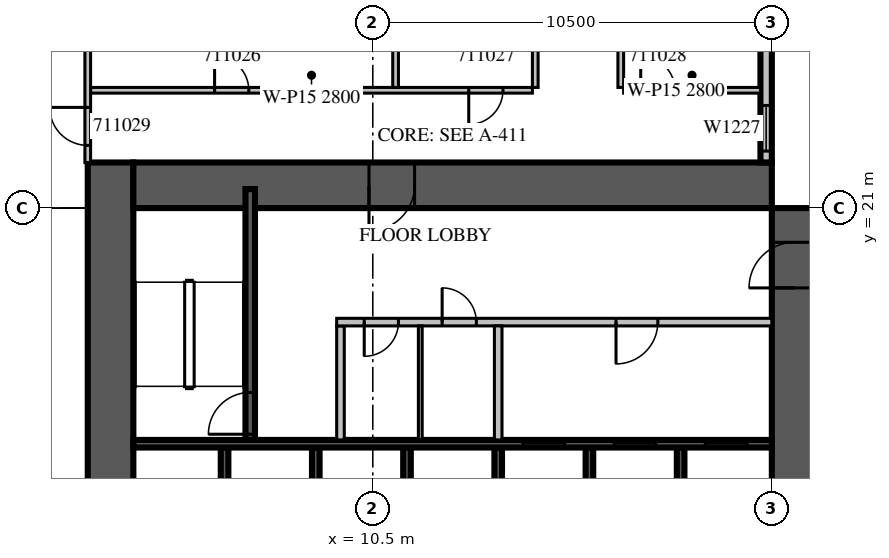
"""IFC4 building model, lengths in metres.
Left out: names, types, materials, properties, quantities, classifications, styles, units other than length and angle.
Written with IfcOpenShell. Run it as: python <this file> out.ifc"""

import sys

from ifc_helpers import new_model, si_unit, direction, frame, frame_2d, origin, place, context, subcontext, project, spatial, rectangle, extrude, source, transform, mapped, element, fill, save


model = new_model("IFC4")
c1 = context("Model", 3, precision=1e-05, world=origin(), true_north=direction((0.0, 1.0)))
c2 = subcontext(c1, "Body", "Model", "MODEL_VIEW")
j1 = project(units=[si_unit("LENGTHUNIT", "METRE"), si_unit("PLANEANGLEUNIT", "RADIAN")], contexts=[c1])
p1 = place(None, origin())
s1 = spatial("IfcSite", under=j1, at=p1, CompositionType="ELEMENT")
p2 = place(p1, origin())
s2 = spatial("IfcBuilding", under=s1, at=p2, CompositionType="ELEMENT")
p3 = place(p2, frame((0.0, 0.0, 57.3)))
s3 = spatial("IfcBuildingStorey", under=s2, at=p3, CompositionType="ELEMENT", Elevation=57.3)
m1 = source(origin(), c2, "Body", "SweptSolid", [
    extrude(rectangle(XDim=18.0, YDim=1.2, at=frame_2d((9.0, 0.0))), origin(), (0.0, 0.0, 1.0), 4.2),
])
p4 = place(p3, frame((3.6, 4.2, 0.0), z_axis=(0.0, 0.0, 1.0), x_axis=(0.0, 1.0, 0.0)))
e1 = element("IfcWall", 1, at=p4, inside=s3, PredefinedType="SHEAR", context=c2, shape_type="MappedRepresentation", body=[
    mapped(m1, transform((0.0, 0.0, 0.0), scale=1.0)),
])
m2 = source(origin(), c2, "Body", "SweptSolid", [
    extrude(rectangle(XDim=2.2, YDim=2.1, at=frame_2d((1.1, 1.05))), frame((0.0, 0.61, 0.0), z_axis=(0.0, -1.0, 0.0), x_axis=(1.0, 0.0, 0.0)), (0.0, 0.0, 1.0), 1.22),
])
p5 = place(p4, frame((4.2, 0.0, 0.0)))
e2 = element("IfcOpeningElement", 2, at=p5, cuts=e1, PredefinedType="OPENING", context=c2, shape_type="MappedRepresentation", body=[
    mapped(m2, transform((0.0, 0.0, 0.0), scale=1.0)),
])
m3 = source(origin(), c2, "Body", "SweptSolid", [
    extrude(rectangle(XDim=16.8, YDim=1.2, at=frame_2d((8.4, 0.0))), origin(), (0.0, 0.0, 1.0), 4.2),
])
p6 = place(p3, frame((21.6, 4.2, 0.0), z_axis=(0.0, 0.0, 1.0), x_axis=(0.0, 1.0, 0.0)))
e3 = element("IfcWall", 3, at=p6, inside=s3, PredefinedType="SHEAR", context=c2, shape_type="MappedRepresentation", body=[
    mapped(m3, transform((0.0, 0.0, 0.0), scale=1.0)),
])
m4 = source(origin(), c2, "Body", "SweptSolid", [
    extrude(rectangle(XDim=1.2, YDim=2.1, at=frame_2d((0.6, 1.05))), frame((0.0, 0.61, 0.0), z_axis=(0.0, -1.0, 0.0), x_axis=(1.0, 0.0, 0.0)), (0.0, 0.0, 1.0), 1.22),
])
p7 = place(p6, frame((14.7, 0.0, 0.0)))
e4 = element("IfcOpeningElement", 4, at=p7, cuts=e3, PredefinedType="OPENING", context=c2, shape_type="MappedRepresentation", body=[
    mapped(m4, transform((0.0, 0.0, 0.0), scale=1.0)),
])
p8 = place(p3, frame((4.2, 21.6, 0.0), z_axis=(0.0, 0.0, 1.0), x_axis=(1.0, 0.0, 0.0)))
e5 = element("IfcWall", 5, at=p8, inside=s3, PredefinedType="SHEAR", context=c2, shape_type="MappedRepresentation", body=[
    mapped(m3, transform((0.0, 0.0, 0.0), scale=1.0)),
])
p9 = place(p8, frame((6.2, 0.0, 0.0)))
e6 = element("IfcOpeningElement", 6, at=p9, cuts=e5, PredefinedType="OPENING", context=c2, shape_type="MappedRepresentation", body=[
    mapped(m4, transform((0.0, 0.0, 0.0), scale=1.0)),
])
p10 = place(p3, frame((20.85, 22.2, 0.0), z_axis=(0.0, 0.0, 1.0), x_axis=(0.0, 1.0, 0.0)))
e7 = element("IfcWall", 7, at=p10, inside=s3, PredefinedType="STANDARD", context=c2, shape_type="SweptSolid", body=[
    extrude(rectangle(XDim=6.6, YDim=0.3, at=frame_2d((3.3, 0.0))), origin(), (0.0, 0.0, 1.0), 3.3),
])
m5 = source(origin(), c2, "Body", "SweptSolid", [
    extrude(rectangle(XDim=1.2, YDim=2.7, at=frame_2d((0.6, 1.35))), frame((0.0, 0.16, 0.0), z_axis=(0.0, -1.0, 0.0), x_axis=(1.0, 0.0, 0.0)), (0.0, 0.0, 1.0), 0.32),
])
p11 = place(p10, frame((0.3, 0.0, 0.6)))
e8 = element("IfcOpeningElement", 8, at=p11, cuts=e7, PredefinedType="OPENING", context=c2, shape_type="MappedRepresentation", body=[
    mapped(m5, transform((0.0, 0.0, 0.0), scale=1.0)),
])
m6 = source(origin(), c2, "Body", "SweptSolid", [
    extrude(rectangle(XDim=2.4, YDim=2.7, at=frame_2d((1.2, 1.35))), frame((0.0, 0.16, 0.0), z_axis=(0.0, -1.0, 0.0), x_axis=(1.0, 0.0, 0.0)), (0.0, 0.0, 1.0), 0.32),
])
p12 = place(p10, frame((3.9, 0.0, 0.6)))
e9 = element("IfcOpeningElement", 9, at=p12, cuts=e7, PredefinedType="OPENING", context=c2, shape_type="MappedRepresentation", body=[
    mapped(m6, transform((0.0, 0.0, 0.0), scale=1.0)),
])
m7 = source(origin(), c2, "Body", "SweptSolid", [
    extrude(rectangle(XDim=3.0, YDim=0.2, at=frame_2d((1.5, 0.0))), origin(), (0.0, 0.0, 1.0), 4.2),
])
for number, where, z_axis, x_axis in (
    (10, (6.6, 11.7, 0.0), (0.0, 0.0, 1.0), (0.0, 1.0, 0.0)),
    (11, (9.0, 11.7, 0.0), (0.0, 0.0, 1.0), (0.0, 1.0, 0.0)),
    (12, (11.4, 11.7, 0.0), (0.0, 0.0, 1.0), (0.0, 1.0, 0.0)),
    (13, (13.8, 11.7, 0.0), (0.0, 0.0, 1.0), (0.0, 1.0, 0.0)),
    (14, (16.2, 11.7, 0.0), (0.0, 0.0, 1.0), (0.0, 1.0, 0.0)),
    (15, (18.6, 11.7, 0.0), (0.0, 0.0, 1.0), (0.0, 1.0, 0.0)),
):
    element("IfcWall", number, at=place(p3, frame(where, z_axis=z_axis, x_axis=x_axis)), inside=s3, PredefinedType="SOLIDWALL", context=c2, shape_type="MappedRepresentation", body=[
        mapped(m7, transform((0.0, 0.0, 0.0), scale=1.0)),
    ])
m8 = source(origin(), c2, "Body", "SweptSolid", [
    extrude(rectangle(XDim=16.8, YDim=0.2, at=frame_2d((8.4, 0.0))), origin(), (0.0, 0.0, 1.0), 4.2),
])
p13 = place(p3, frame((4.2, 14.8, 0.0), z_axis=(0.0, 0.0, 1.0), x_axis=(1.0, 0.0, 0.0)))
e16 = element("IfcWall", 16, at=p13, inside=s3, PredefinedType="SOLIDWALL", context=c2, shape_type="MappedRepresentation", body=[
    mapped(m8, transform((0.0, 0.0, 0.0), scale=1.0)),
])
m9 = source(origin(), c2, "Body", "SweptSolid", [
    extrude(rectangle(XDim=1.1, YDim=2.1, at=frame_2d((0.55, 1.05))), frame((0.0, 0.11, 0.0), z_axis=(0.0, -1.0, 0.0), x_axis=(1.0, 0.0, 0.0)), (0.0, 0.0, 1.0), 0.22),
])
p14 = place(p13, frame((10.25, 0.0, 0.0)))
e17 = element("IfcOpeningElement", 17, at=p14, cuts=e16, PredefinedType="OPENING", context=c2, shape_type="MappedRepresentation", body=[
    mapped(m9, transform((0.0, 0.0, 0.0), scale=1.0)),
])
p15 = place(p13, frame((12.65, 0.0, 0.0)))
e18 = element("IfcOpeningElement", 18, at=p15, cuts=e16, PredefinedType="OPENING", context=c2, shape_type="MappedRepresentation", body=[
    mapped(m9, transform((0.0, 0.0, 0.0), scale=1.0)),
])
p16 = place(p13, frame((15.05, 0.0, 0.0)))
e19 = element("IfcOpeningElement", 19, at=p16, cuts=e16, PredefinedType="OPENING", context=c2, shape_type="MappedRepresentation", body=[
    mapped(m9, transform((0.0, 0.0, 0.0), scale=1.0)),
])
m10 = source(origin(), c2, "Body", "SweptSolid", [
    extrude(rectangle(XDim=6.6, YDim=0.25, at=frame_2d((3.3, 0.0))), origin(), (0.0, 0.0, 1.0), 3.8),
])
p17 = place(p3, frame((7.275, 14.9, 0.0), z_axis=(0.0, 0.0, 1.0), x_axis=(0.0, 1.0, 0.0)))
e20 = element("IfcWall", 20, at=p17, inside=s3, PredefinedType="SOLIDWALL", context=c2, shape_type="MappedRepresentation", body=[
    mapped(m10, transform((0.0, 0.0, 0.0), scale=1.0)),
])
m11 = source(origin(), c2, "Body", "SweptSolid", [
    extrude(rectangle(XDim=1.1, YDim=2.1, at=frame_2d((0.55, 1.05))), frame((0.0, 0.135, 0.0), z_axis=(0.0, -1.0, 0.0), x_axis=(1.0, 0.0, 0.0)), (0.0, 0.0, 1.0), 0.27),
])
p18 = place(p17, frame((0.15, 0.0, 0.0)))
e21 = element("IfcOpeningElement", 21, at=p18, cuts=e20, PredefinedType="OPENING", context=c2, shape_type="MappedRepresentation", body=[
    mapped(m11, transform((0.0, 0.0, 0.0), scale=1.0)),
])
m12 = source(origin(), c2, "Body", "SweptSolid", [
    extrude(rectangle(XDim=3.0, YDim=0.2, at=frame_2d((1.5, 0.0))), origin(), (0.0, 0.0, 1.0), 3.8),
])
p19 = place(p3, frame((9.65, 14.9, 0.0), z_axis=(0.0, 0.0, 1.0), x_axis=(0.0, 1.0, 0.0)))
e22 = element("IfcWall", 22, at=p19, inside=s3, PredefinedType="PARTITIONING", context=c2, shape_type="MappedRepresentation", body=[
    mapped(m12, transform((0.0, 0.0, 0.0), scale=1.0)),
])
m13 = source(origin(), c2, "Body", "SweptSolid", [
    extrude(rectangle(XDim=11.45, YDim=0.2, at=frame_2d((5.725, 0.0))), origin(), (0.0, 0.0, 1.0), 3.8),
])
p20 = place(p3, frame((9.55, 18.0, 0.0), z_axis=(0.0, 0.0, 1.0), x_axis=(1.0, 0.0, 0.0)))
e23 = element("IfcWall", 23, at=p20, inside=s3, PredefinedType="PARTITIONING", context=c2, shape_type="MappedRepresentation", body=[
    mapped(m13, transform((0.0, 0.0, 0.0), scale=1.0)),
])
m14 = source(origin(), c2, "Body", "SweptSolid", [
    extrude(rectangle(XDim=0.9, YDim=2.1, at=frame_2d((0.45, 1.05))), frame((0.0, 0.11, 0.0), z_axis=(0.0, -1.0, 0.0), x_axis=(1.0, 0.0, 0.0)), (0.0, 0.0, 1.0), 0.22),
])
p21 = place(p20, frame((0.725, 0.0, 0.0)))
e24 = element("IfcOpeningElement", 24, at=p21, cuts=e23, PredefinedType="OPENING", context=c2, shape_type="MappedRepresentation", body=[
    mapped(m14, transform((0.0, 0.0, 0.0), scale=1.0)),
])
p22 = place(p20, frame((2.775, 0.0, 0.0)))
e25 = element("IfcOpeningElement", 25, at=p22, cuts=e23, PredefinedType="OPENING", context=c2, shape_type="MappedRepresentation", body=[
    mapped(m14, transform((0.0, 0.0, 0.0), scale=1.0)),
])
p23 = place(p20, frame((7.35, 0.0, 0.0)))
e26 = element("IfcOpeningElement", 26, at=p23, cuts=e23, PredefinedType="OPENING", context=c2, shape_type="MappedRepresentation", body=[
    mapped(m9, transform((0.0, 0.0, 0.0), scale=1.0)),
])
p24 = place(p3, frame((13.8, 14.9, 0.0), z_axis=(0.0, 0.0, 1.0), x_axis=(0.0, 1.0, 0.0)))
e27 = element("IfcWall", 27, at=p24, inside=s3, PredefinedType="PARTITIONING", context=c2, shape_type="MappedRepresentation", body=[
    mapped(m12, transform((0.0, 0.0, 0.0), scale=1.0)),
])
m15 = source(origin(), c2, "Body", "SweptSolid", [
    extrude(rectangle(XDim=3.0, YDim=0.1, at=frame_2d((1.5, 0.0))), origin(), (0.0, 0.0, 1.0), 3.8),
])
p25 = place(p3, frame((11.75, 14.9, 0.0), z_axis=(0.0, 0.0, 1.0), x_axis=(0.0, 1.0, 0.0)))
e28 = element("IfcWall", 28, at=p25, inside=s3, PredefinedType="PARTITIONING", context=c2, shape_type="MappedRepresentation", body=[
    mapped(m15, transform((0.0, 0.0, 0.0), scale=1.0)),
])
p26 = place(p3, frame((3.075, 24.1, 0.0), z_axis=(0.0, 0.0, 1.0), x_axis=(1.0, 0.0, 0.0)))
e29 = element("IfcWall", 29, at=p26, inside=s3, PredefinedType="PARTITIONING", context=c2, shape_type="SweptSolid", body=[
    extrude(rectangle(XDim=11.625, YDim=0.15, at=frame_2d((5.812, 0.0))), origin(), (0.0, 0.0, 1.0), 2.8),
])
m16 = source(origin(), c2, "Body", "SweptSolid", [
    extrude(rectangle(XDim=0.9, YDim=2.1, at=frame_2d((0.45, 1.05))), frame((0.0, 0.085, 0.0), z_axis=(0.0, -1.0, 0.0), x_axis=(1.0, 0.0, 0.0)), (0.0, 0.0, 1.0), 0.17),
])
p27 = place(p26, frame((3.263, 0.0, 0.0)))
e30 = element("IfcOpeningElement", 30, at=p27, cuts=e29, PredefinedType="OPENING", context=c2, shape_type="MappedRepresentation", body=[
    mapped(m16, transform((0.0, 0.0, 0.0), scale=1.0)),
])
p28 = place(p26, frame((9.95, 0.0, 0.0)))
e31 = element("IfcOpeningElement", 31, at=p28, cuts=e29, PredefinedType="OPENING", context=c2, shape_type="MappedRepresentation", body=[
    mapped(m16, transform((0.0, 0.0, 0.0), scale=1.0)),
])
m17 = source(origin(), c2, "Body", "SweptSolid", [
    extrude(rectangle(XDim=3.6, YDim=0.15, at=frame_2d((1.8, 0.0))), origin(), (0.0, 0.0, 1.0), 2.8),
])
p29 = place(p3, frame((17.1, 24.1, 0.0), z_axis=(0.0, 0.0, 1.0), x_axis=(1.0, 0.0, 0.0)))
e32 = element("IfcWall", 32, at=p29, inside=s3, PredefinedType="PARTITIONING", context=c2, shape_type="MappedRepresentation", body=[
    mapped(m17, transform((0.0, 0.0, 0.0), scale=1.0)),
])
p30 = place(p29, frame((0.45, 0.0, 0.0)))
e33 = element("IfcOpeningElement", 33, at=p30, cuts=e32, PredefinedType="OPENING", context=c2, shape_type="MappedRepresentation", body=[
    mapped(m16, transform((0.0, 0.0, 0.0), scale=1.0)),
])
m18 = source(origin(), c2, "Body", "SweptSolid", [
    extrude(rectangle(XDim=5.15, YDim=0.15, at=frame_2d((2.575, 0.0))), origin(), (0.0, 0.0, 1.0), 3.3),
])
for number, where, z_axis, x_axis in (
    (34, (11.1, 24.175, 0.0), (0.0, 0.0, 1.0), (0.0, 1.0, 0.0)),
    (35, (14.775, 24.175, 0.0), (0.0, 0.0, 1.0), (0.0, 1.0, 0.0)),
    (36, (17.025, 29.325, 0.0), (0.0, 0.0, 1.0), (0.0, -1.0, 0.0)),
):
    element("IfcWall", number, at=place(p3, frame(where, z_axis=z_axis, x_axis=x_axis)), inside=s3, PredefinedType="PARTITIONING", context=c2, shape_type="MappedRepresentation", body=[
        mapped(m18, transform((0.0, 0.0, 0.0), scale=1.0)),
    ])
m19 = source(origin(), c2, "Body", "SweptSolid", [
    extrude(rectangle(XDim=7.125, YDim=0.15, at=frame_2d((3.562, 0.0))), origin(), (0.0, 0.0, 1.0), 3.8),
])
p31 = place(p3, frame((3.0, 29.325, 0.0), z_axis=(0.0, 0.0, 1.0), x_axis=(0.0, -1.0, 0.0)))
e37 = element("IfcWall", 37, at=p31, inside=s3, PredefinedType="PARTITIONING", context=c2, shape_type="MappedRepresentation", body=[
    mapped(m19, transform((0.0, 0.0, 0.0), scale=1.0)),
])
m20 = source(origin(), c2, "Body", "SweptSolid", [
    extrude(rectangle(XDim=1.0, YDim=2.1, at=frame_2d((0.5, 1.05))), frame((0.0, 0.085, 0.0), z_axis=(0.0, -1.0, 0.0), x_axis=(1.0, 0.0, 0.0)), (0.0, 0.0, 1.0), 0.17),
])
p32 = place(p31, frame((5.675, 0.0, 0.0)))
e38 = element("IfcOpeningElement", 38, at=p32, cuts=e37, PredefinedType="OPENING", context=c2, shape_type="MappedRepresentation", body=[
    mapped(m20, transform((0.0, 0.0, 0.0), scale=1.0)),
])
m21 = source(origin(), c2, "Body", "SweptSolid", [
    extrude(rectangle(XDim=1.2, YDim=2.7, at=frame_2d((0.6, 1.35))), frame((0.0, 0.03, 0.0), z_axis=(0.0, -1.0, 0.0), x_axis=(1.0, 0.0, 0.0)), (0.0, 0.0, 1.0), 0.06),
])
p33 = place(p11, origin())
e39 = element("IfcWindow", 39, at=p33, inside=s3, PartitioningType="SINGLE_PANEL", PredefinedType="WINDOW", context=c2, shape_type="MappedRepresentation", body=[
    mapped(m21, transform((0.0, 0.0, 0.0), scale=1.0)),
])
fill(e8, e39)
m22 = source(origin(), c2, "Body", "SweptSolid", [
    extrude(rectangle(XDim=1.1, YDim=2.1, at=frame_2d((0.55, 1.05))), frame((0.0, 0.025, 0.0), z_axis=(0.0, -1.0, 0.0), x_axis=(1.0, 0.0, 0.0)), (0.0, 0.0, 1.0), 0.05),
])
p34 = place(p14, origin())
e40 = element("IfcDoor", 40, at=p34, inside=s3, OperationType="SLIDING_TO_LEFT", PredefinedType="DOOR", context=c2, shape_type="MappedRepresentation", body=[
    mapped(m22, transform((0.0, 0.0, 0.0), scale=1.0)),
])
fill(e17, e40)
p35 = place(p15, origin())
e41 = element("IfcDoor", 41, at=p35, inside=s3, OperationType="SLIDING_TO_LEFT", PredefinedType="DOOR", context=c2, shape_type="MappedRepresentation", body=[
    mapped(m22, transform((0.0, 0.0, 0.0), scale=1.0)),
])
fill(e18, e41)
p36 = place(p16, origin())
e42 = element("IfcDoor", 42, at=p36, inside=s3, OperationType="SLIDING_TO_LEFT", PredefinedType="DOOR", context=c2, shape_type="MappedRepresentation", body=[
    mapped(m22, transform((0.0, 0.0, 0.0), scale=1.0)),
])
fill(e19, e42)
p37 = place(p18, origin())
e43 = element("IfcDoor", 43, at=p37, inside=s3, OperationType="SINGLE_SWING_LEFT", PredefinedType="DOOR", context=c2, shape_type="MappedRepresentation", body=[
    mapped(m22, transform((0.0, 0.0, 0.0), scale=1.0)),
])
fill(e21, e43)
m23 = source(origin(), c2, "Body", "SweptSolid", [
    extrude(rectangle(XDim=0.9, YDim=2.1, at=frame_2d((0.45, 1.05))), frame((0.0, 0.025, 0.0), z_axis=(0.0, -1.0, 0.0), x_axis=(1.0, 0.0, 0.0)), (0.0, 0.0, 1.0), 0.05),
])
p38 = place(p21, origin())
e44 = element("IfcDoor", 44, at=p38, inside=s3, OperationType="SINGLE_SWING_RIGHT", PredefinedType="DOOR", context=c2, shape_type="MappedRepresentation", body=[
    mapped(m23, transform((0.0, 0.0, 0.0), scale=1.0)),
])
fill(e24, e44)
p39 = place(p22, origin())
e45 = element("IfcDoor", 45, at=p39, inside=s3, OperationType="SINGLE_SWING_LEFT", PredefinedType="DOOR", context=c2, shape_type="MappedRepresentation", body=[
    mapped(m23, transform((0.0, 0.0, 0.0), scale=1.0)),
])
fill(e25, e45)
p40 = place(p23, origin())
e46 = element("IfcDoor", 46, at=p40, inside=s3, OperationType="SINGLE_SWING_RIGHT", PredefinedType="DOOR", context=c2, shape_type="MappedRepresentation", body=[
    mapped(m22, transform((0.0, 0.0, 0.0), scale=1.0)),
])
fill(e26, e46)
m24 = source(origin(), c2, "Body", "SweptSolid", [
    extrude(rectangle(XDim=1.2, YDim=2.1, at=frame_2d((0.6, 1.05))), frame((0.0, 0.025, 0.0), z_axis=(0.0, -1.0, 0.0), x_axis=(1.0, 0.0, 0.0)), (0.0, 0.0, 1.0), 0.05),
])
p41 = place(p9, origin())
e47 = element("IfcDoor", 47, at=p41, inside=s3, OperationType="SINGLE_SWING_RIGHT", PredefinedType="DOOR", context=c2, shape_type="MappedRepresentation", body=[
    mapped(m24, transform((0.0, 0.0, 0.0), scale=1.0)),
])
fill(e6, e47)
p42 = place(p7, origin())
e48 = element("IfcDoor", 48, at=p42, inside=s3, OperationType="SINGLE_SWING_LEFT", PredefinedType="DOOR", context=c2, shape_type="MappedRepresentation", body=[
    mapped(m24, transform((0.0, 0.0, 0.0), scale=1.0)),
])
fill(e4, e48)
p43 = place(p27, origin())
e49 = element("IfcDoor", 49, at=p43, inside=s3, OperationType="SINGLE_SWING_LEFT", PredefinedType="DOOR", context=c2, shape_type="MappedRepresentation", body=[
    mapped(m23, transform((0.0, 0.0, 0.0), scale=1.0)),
])
fill(e30, e49)
p44 = place(p28, origin())
e50 = element("IfcDoor", 50, at=p44, inside=s3, OperationType="SINGLE_SWING_RIGHT", PredefinedType="DOOR", context=c2, shape_type="MappedRepresentation", body=[
    mapped(m23, transform((0.0, 0.0, 0.0), scale=1.0)),
])
fill(e31, e50)
p45 = place(p30, origin())
e51 = element("IfcDoor", 51, at=p45, inside=s3, OperationType="SINGLE_SWING_LEFT", PredefinedType="DOOR", context=c2, shape_type="MappedRepresentation", body=[
    mapped(m23, transform((0.0, 0.0, 0.0), scale=1.0)),
])
fill(e33, e51)
m25 = source(origin(), c2, "Body", "SweptSolid", [
    extrude(rectangle(XDim=1.0, YDim=2.1, at=frame_2d((0.5, 1.05))), frame((0.0, 0.025, 0.0), z_axis=(0.0, -1.0, 0.0), x_axis=(1.0, 0.0, 0.0)), (0.0, 0.0, 1.0), 0.05),
])
p46 = place(p32, origin())
e52 = element("IfcDoor", 52, at=p46, inside=s3, OperationType="SINGLE_SWING_RIGHT", PredefinedType="DOOR", context=c2, shape_type="MappedRepresentation", body=[
    mapped(m25, transform((0.0, 0.0, 0.0), scale=1.0)),
])
fill(e38, e52)
save(model, sys.argv[1])
